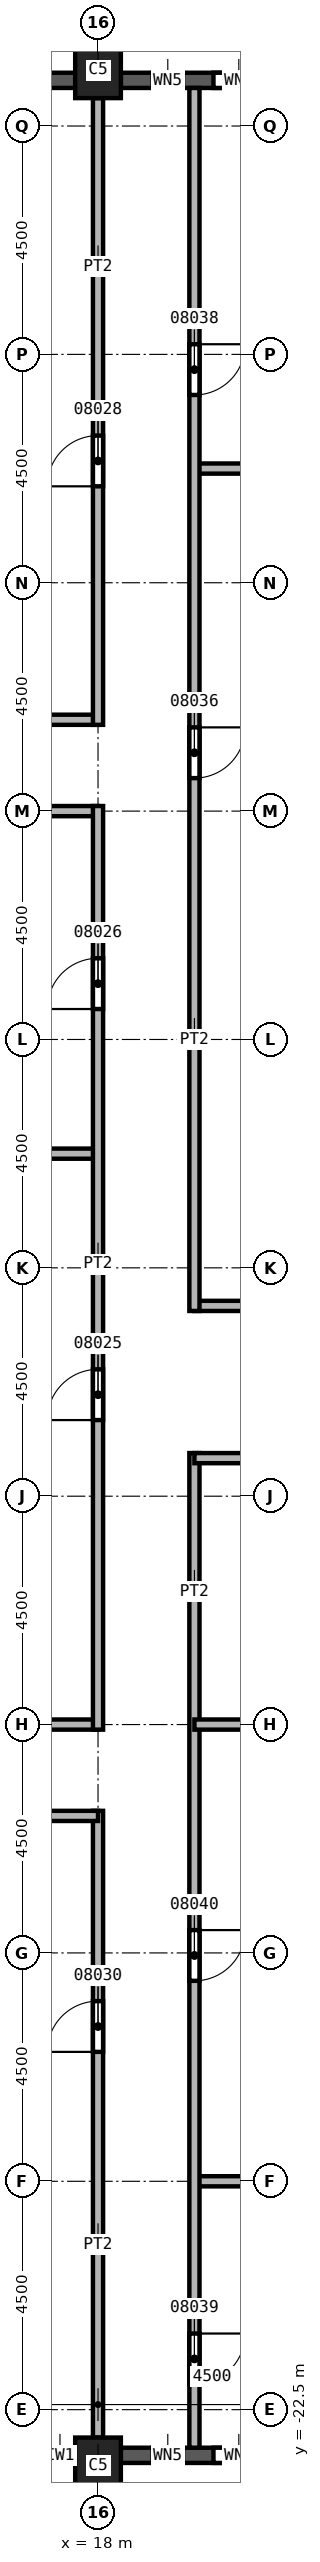
"""IFC4 building model, lengths in metres.
Left out: names, types, materials, properties, quantities, classifications, styles, units other than length and angle.
Written with IfcOpenShell. Run it as: python <this file> out.ifc"""

import sys

from ifc_helpers import new_model, si_unit, direction, frame, frame_2d, origin, origin_2d, place, context, subcontext, project, spatial, rectangle, extrude, element, fill, save


model = new_model("IFC4")
c1 = context("Model", 3, precision=1e-05, world=origin(), true_north=direction((0.0, 1.0)))
c2 = subcontext(c1, "Body", "Model", "MODEL_VIEW")
j1 = project(units=[si_unit("LENGTHUNIT", "METRE"), si_unit("PLANEANGLEUNIT", "RADIAN")], contexts=[c1])
p1 = place(None, origin())
s1 = spatial("IfcSite", under=j1, at=p1, CompositionType="ELEMENT")
p2 = place(p1, origin())
s2 = spatial("IfcBuilding", under=s1, at=p2, CompositionType="ELEMENT")
p3 = place(p2, frame((0.0, 0.0, 150.0)))
s3 = spatial("IfcBuildingStorey", under=s2, at=p3, CompositionType="ELEMENT", Elevation=150.0)
for number, where, z_axis, x_axis in (
    (1, (18.0, 23.6, 0.0), (0.0, 0.0, 1.0), (1.0, 0.0, 0.0)),
    (2, (18.0, -23.6, 0.0), (0.0, 0.0, 1.0), (1.0, 0.0, 0.0)),
):
    element("IfcColumn", number, at=place(p3, frame(where, z_axis=z_axis, x_axis=x_axis)), inside=s3, PredefinedType="COLUMN", context=c2, shape_type="SweptSolid", body=[
        extrude(rectangle(XDim=0.9, YDim=1.1, at=origin_2d()), origin(), (0.0, 0.0, 1.0), 3.7),
    ])
p4 = place(p3, frame((13.95, -23.4, 0.0), z_axis=(0.0, 0.0, 1.0), x_axis=(1.0, 0.0, 0.0)))
e3 = element("IfcWall", 3, at=p4, inside=s3, PredefinedType="SOLIDWALL", context=c2, shape_type="SweptSolid", body=[
    extrude(rectangle(XDim=3.6, YDim=0.3, at=frame_2d((1.8, 0.0))), origin(), (0.0, 0.0, 1.0), 3.1),
])
p5 = place(p4, frame((0.6, 0.0, 0.8)))
e4 = element("IfcOpeningElement", 4, at=p5, cuts=e3, PredefinedType="OPENING", context=c2, shape_type="SweptSolid", body=[
    extrude(rectangle(XDim=2.4, YDim=1.95, at=frame_2d((1.2, 0.975))), frame((0.0, 0.15, 0.0), z_axis=(0.0, -1.0, 0.0), x_axis=(1.0, 0.0, 0.0)), (0.0, 0.0, 1.0), 0.3),
])
p6 = place(p3, frame((18.45, -23.4, 0.0), z_axis=(0.0, 0.0, 1.0), x_axis=(1.0, 0.0, 0.0)))
e5 = element("IfcWall", 5, at=p6, inside=s3, PredefinedType="SOLIDWALL", context=c2, shape_type="SweptSolid", body=[
    extrude(rectangle(XDim=3.6, YDim=0.3, at=frame_2d((1.8, 0.0))), origin(), (0.0, 0.0, 1.0), 3.1),
])
p7 = place(p6, frame((0.625, 0.0, 0.8)))
e6 = element("IfcOpeningElement", 6, at=p7, cuts=e5, PredefinedType="OPENING", context=c2, shape_type="SweptSolid", body=[
    extrude(rectangle(XDim=0.6, YDim=1.95, at=frame_2d((0.3, 0.975))), frame((0.0, 0.15, 0.0), z_axis=(0.0, -1.0, 0.0), x_axis=(1.0, 0.0, 0.0)), (0.0, 0.0, 1.0), 0.3),
])
p8 = place(p6, frame((1.825, 0.0, 0.8)))
e7 = element("IfcOpeningElement", 7, at=p8, cuts=e5, PredefinedType="OPENING", context=c2, shape_type="SweptSolid", body=[
    extrude(rectangle(XDim=1.0, YDim=1.95, at=frame_2d((0.5, 0.975))), frame((0.0, 0.15, 0.0), z_axis=(0.0, -1.0, 0.0), x_axis=(1.0, 0.0, 0.0)), (0.0, 0.0, 1.0), 0.3),
])
p9 = place(p3, frame((22.05, 23.4, 0.0), z_axis=(0.0, 0.0, 1.0), x_axis=(-1.0, 0.0, 0.0)))
e8 = element("IfcWall", 8, at=p9, inside=s3, PredefinedType="SOLIDWALL", context=c2, shape_type="SweptSolid", body=[
    extrude(rectangle(XDim=3.6, YDim=0.3, at=frame_2d((1.8, 0.0))), origin(), (0.0, 0.0, 1.0), 3.1),
])
p10 = place(p9, frame((0.775, 0.0, 0.8)))
e9 = element("IfcOpeningElement", 9, at=p10, cuts=e8, PredefinedType="OPENING", context=c2, shape_type="SweptSolid", body=[
    extrude(rectangle(XDim=1.0, YDim=1.95, at=frame_2d((0.5, 0.975))), frame((0.0, 0.15, 0.0), z_axis=(0.0, -1.0, 0.0), x_axis=(1.0, 0.0, 0.0)), (0.0, 0.0, 1.0), 0.3),
])
p11 = place(p9, frame((2.375, 0.0, 0.8)))
e10 = element("IfcOpeningElement", 10, at=p11, cuts=e8, PredefinedType="OPENING", context=c2, shape_type="SweptSolid", body=[
    extrude(rectangle(XDim=0.6, YDim=1.95, at=frame_2d((0.3, 0.975))), frame((0.0, 0.15, 0.0), z_axis=(0.0, -1.0, 0.0), x_axis=(1.0, 0.0, 0.0)), (0.0, 0.0, 1.0), 0.3),
])
p12 = place(p3, frame((17.55, 23.4, 0.0), z_axis=(0.0, 0.0, 1.0), x_axis=(-1.0, 0.0, 0.0)))
e11 = element("IfcWall", 11, at=p12, inside=s3, PredefinedType="SOLIDWALL", context=c2, shape_type="SweptSolid", body=[
    extrude(rectangle(XDim=3.6, YDim=0.3, at=frame_2d((1.8, 0.0))), origin(), (0.0, 0.0, 1.0), 3.1),
])
p13 = place(p12, frame((0.6, 0.0, 0.8)))
e12 = element("IfcOpeningElement", 12, at=p13, cuts=e11, PredefinedType="OPENING", context=c2, shape_type="SweptSolid", body=[
    extrude(rectangle(XDim=2.4, YDim=1.95, at=frame_2d((1.2, 0.975))), frame((0.0, 0.15, 0.0), z_axis=(0.0, -1.0, 0.0), x_axis=(1.0, 0.0, 0.0)), (0.0, 0.0, 1.0), 0.3),
])
for number, where, z_axis, x_axis in (
    (13, (13.5, -9.0, 0.0), (0.0, 0.0, 1.0), (1.0, 0.0, 0.0)),
    (14, (13.5, 2.25, 0.0), (0.0, 0.0, 1.0), (1.0, 0.0, 0.0)),
    (15, (18.0, 9.0, 0.0), (0.0, 0.0, 1.0), (-1.0, 0.0, 0.0)),
):
    element("IfcWall", number, at=place(p3, frame(where, z_axis=z_axis, x_axis=x_axis)), inside=s3, PredefinedType="PARTITIONING", context=c2, shape_type="SweptSolid", body=[
        extrude(rectangle(XDim=4.5, YDim=0.2, at=frame_2d((2.25, 0.0))), origin(), (0.0, 0.0, 1.0), 3.7),
    ])
p14 = place(p3, frame((14.4, 10.8, 0.0), z_axis=(0.0, 0.0, 1.0), x_axis=(1.0, 0.0, 0.0)))
e16 = element("IfcWall", 16, at=p14, inside=s3, PredefinedType="PARTITIONING", context=c2, shape_type="SweptSolid", body=[
    extrude(rectangle(XDim=3.6, YDim=0.2, at=frame_2d((1.8, 0.0))), origin(), (0.0, 0.0, 1.0), 3.7),
])
p15 = place(p3, frame((18.0, -23.05, 0.0), z_axis=(0.0, 0.0, 1.0), x_axis=(0.0, 1.0, 0.0)))
e17 = element("IfcWall", 17, at=p15, inside=s3, PredefinedType="PARTITIONING", context=c2, shape_type="SweptSolid", body=[
    extrude(rectangle(XDim=12.35, YDim=0.2, at=frame_2d((6.175, 0.0))), origin(), (0.0, 0.0, 1.0), 3.7),
])
p16 = place(p15, frame((7.6, 0.0, 0.0)))
e18 = element("IfcOpeningElement", 18, at=p16, cuts=e17, PredefinedType="OPENING", context=c2, shape_type="SweptSolid", body=[
    extrude(rectangle(XDim=1.0, YDim=2.1, at=frame_2d((0.5, 1.05))), frame((0.0, 0.1, 0.0), z_axis=(0.0, -1.0, 0.0), x_axis=(1.0, 0.0, 0.0)), (0.0, 0.0, 1.0), 0.2),
])
p17 = place(p3, frame((18.0, -10.8, 0.0), z_axis=(0.0, 0.0, 1.0), x_axis=(-1.0, 0.0, 0.0)))
e19 = element("IfcWall", 19, at=p17, inside=s3, PredefinedType="PARTITIONING", context=c2, shape_type="SweptSolid", body=[
    extrude(rectangle(XDim=3.6, YDim=0.2, at=frame_2d((1.8, 0.0))), origin(), (0.0, 0.0, 1.0), 3.7),
])
p18 = place(p3, frame((18.0, -9.1, 0.0), z_axis=(0.0, 0.0, 1.0), x_axis=(0.0, 1.0, 0.0)))
e20 = element("IfcWall", 20, at=p18, inside=s3, PredefinedType="PARTITIONING", context=c2, shape_type="SweptSolid", body=[
    extrude(rectangle(XDim=18.2, YDim=0.2, at=frame_2d((9.1, 0.0))), origin(), (0.0, 0.0, 1.0), 3.7),
])
p19 = place(p18, frame((6.1, 0.0, 0.0)))
e21 = element("IfcOpeningElement", 21, at=p19, cuts=e20, PredefinedType="OPENING", context=c2, shape_type="SweptSolid", body=[
    extrude(rectangle(XDim=1.0, YDim=2.1, at=frame_2d((0.5, 1.05))), frame((0.0, 0.1, 0.0), z_axis=(0.0, -1.0, 0.0), x_axis=(1.0, 0.0, 0.0)), (0.0, 0.0, 1.0), 0.2),
])
p20 = place(p18, frame((14.2, 0.0, 0.0)))
e22 = element("IfcOpeningElement", 22, at=p20, cuts=e20, PredefinedType="OPENING", context=c2, shape_type="SweptSolid", body=[
    extrude(rectangle(XDim=1.0, YDim=2.1, at=frame_2d((0.5, 1.05))), frame((0.0, 0.1, 0.0), z_axis=(0.0, -1.0, 0.0), x_axis=(1.0, 0.0, 0.0)), (0.0, 0.0, 1.0), 0.2),
])
p21 = place(p3, frame((18.0, 10.7, 0.0), z_axis=(0.0, 0.0, 1.0), x_axis=(0.0, 1.0, 0.0)))
e23 = element("IfcWall", 23, at=p21, inside=s3, PredefinedType="PARTITIONING", context=c2, shape_type="SweptSolid", body=[
    extrude(rectangle(XDim=12.35, YDim=0.2, at=frame_2d((6.175, 0.0))), origin(), (0.0, 0.0, 1.0), 3.7),
])
p22 = place(p21, frame((4.7, 0.0, 0.0)))
e24 = element("IfcOpeningElement", 24, at=p22, cuts=e23, PredefinedType="OPENING", context=c2, shape_type="SweptSolid", body=[
    extrude(rectangle(XDim=1.0, YDim=2.1, at=frame_2d((0.5, 1.05))), frame((0.0, 0.1, 0.0), z_axis=(0.0, -1.0, 0.0), x_axis=(1.0, 0.0, 0.0)), (0.0, 0.0, 1.0), 0.2),
])
p23 = place(p3, frame((19.9, -18.0, 0.0), z_axis=(0.0, 0.0, 1.0), x_axis=(1.0, 0.0, 0.0)))
e25 = element("IfcWall", 25, at=p23, inside=s3, PredefinedType="PARTITIONING", context=c2, shape_type="SweptSolid", body=[
    extrude(rectangle(XDim=4.3, YDim=0.2, at=frame_2d((2.15, 0.0))), origin(), (0.0, 0.0, 1.0), 3.7),
])
p24 = place(p3, frame((19.9, -3.65, 0.0), z_axis=(0.0, 0.0, 1.0), x_axis=(0.0, -1.0, 0.0)))
e26 = element("IfcWall", 26, at=p24, inside=s3, PredefinedType="PARTITIONING", context=c2, shape_type="SweptSolid", body=[
    extrude(rectangle(XDim=19.6, YDim=0.2, at=frame_2d((9.8, 0.0))), origin(), (0.0, 0.0, 1.0), 3.7),
])
p25 = place(p24, frame((17.35, 0.0, 0.0)))
e27 = element("IfcOpeningElement", 27, at=p25, cuts=e26, PredefinedType="OPENING", context=c2, shape_type="SweptSolid", body=[
    extrude(rectangle(XDim=1.0, YDim=2.1, at=frame_2d((0.5, 1.05))), frame((0.0, 0.1, 0.0), z_axis=(0.0, -1.0, 0.0), x_axis=(1.0, 0.0, 0.0)), (0.0, 0.0, 1.0), 0.2),
])
p26 = place(p24, frame((9.4, 0.0, 0.0)))
e28 = element("IfcOpeningElement", 28, at=p26, cuts=e26, PredefinedType="OPENING", context=c2, shape_type="SweptSolid", body=[
    extrude(rectangle(XDim=1.0, YDim=2.1, at=frame_2d((0.5, 1.05))), frame((0.0, 0.1, 0.0), z_axis=(0.0, -1.0, 0.0), x_axis=(1.0, 0.0, 0.0)), (0.0, 0.0, 1.0), 0.2),
])
p27 = place(p3, frame((19.9, -9.0, 0.0), z_axis=(0.0, 0.0, 1.0), x_axis=(1.0, 0.0, 0.0)))
e29 = element("IfcWall", 29, at=p27, inside=s3, PredefinedType="PARTITIONING", context=c2, shape_type="SweptSolid", body=[
    extrude(rectangle(XDim=7.2, YDim=0.2, at=frame_2d((3.6, 0.0))), origin(), (0.0, 0.0, 1.0), 3.7),
])
p28 = place(p3, frame((19.9, -0.75, 0.0), z_axis=(0.0, 0.0, 1.0), x_axis=(1.0, 0.0, 0.0)))
e30 = element("IfcWall", 30, at=p28, inside=s3, PredefinedType="PARTITIONING", context=c2, shape_type="SweptSolid", body=[
    extrude(rectangle(XDim=13.95, YDim=0.2, at=frame_2d((6.975, 0.0))), origin(), (0.0, 0.0, 1.0), 3.7),
])
p29 = place(p28, frame((10.4, 0.0, 0.0)))
e31 = element("IfcOpeningElement", 31, at=p29, cuts=e30, PredefinedType="OPENING", context=c2, shape_type="SweptSolid", body=[
    extrude(rectangle(XDim=1.0, YDim=2.1, at=frame_2d((0.5, 1.05))), frame((0.0, 0.1, 0.0), z_axis=(0.0, -1.0, 0.0), x_axis=(1.0, 0.0, 0.0)), (0.0, 0.0, 1.0), 0.2),
])
p30 = place(p3, frame((19.9, 15.75, 0.0), z_axis=(0.0, 0.0, 1.0), x_axis=(1.0, 0.0, 0.0)))
e32 = element("IfcWall", 32, at=p30, inside=s3, PredefinedType="PARTITIONING", context=c2, shape_type="SweptSolid", body=[
    extrude(rectangle(XDim=7.2, YDim=0.2, at=frame_2d((3.6, 0.0))), origin(), (0.0, 0.0, 1.0), 3.7),
])
p31 = place(p3, frame((19.9, 23.25, 0.0), z_axis=(0.0, 0.0, 1.0), x_axis=(0.0, -1.0, 0.0)))
e33 = element("IfcWall", 33, at=p31, inside=s3, PredefinedType="PARTITIONING", context=c2, shape_type="SweptSolid", body=[
    extrude(rectangle(XDim=24.1, YDim=0.2, at=frame_2d((12.05, 0.0))), origin(), (0.0, 0.0, 1.0), 3.7),
])
p32 = place(p31, frame((12.6, 0.0, 0.0)))
e34 = element("IfcOpeningElement", 34, at=p32, cuts=e33, PredefinedType="OPENING", context=c2, shape_type="SweptSolid", body=[
    extrude(rectangle(XDim=1.0, YDim=2.1, at=frame_2d((0.5, 1.05))), frame((0.0, 0.1, 0.0), z_axis=(0.0, -1.0, 0.0), x_axis=(1.0, 0.0, 0.0)), (0.0, 0.0, 1.0), 0.2),
])
p33 = place(p31, frame((5.05, 0.0, 0.0)))
e35 = element("IfcOpeningElement", 35, at=p33, cuts=e33, PredefinedType="OPENING", context=c2, shape_type="SweptSolid", body=[
    extrude(rectangle(XDim=1.0, YDim=2.1, at=frame_2d((0.5, 1.05))), frame((0.0, 0.1, 0.0), z_axis=(0.0, -1.0, 0.0), x_axis=(1.0, 0.0, 0.0)), (0.0, 0.0, 1.0), 0.2),
])
p34 = place(p3, frame((33.85, -3.75, 0.0), z_axis=(0.0, 0.0, 1.0), x_axis=(-1.0, 0.0, 0.0)))
e36 = element("IfcWall", 36, at=p34, inside=s3, PredefinedType="PARTITIONING", context=c2, shape_type="SweptSolid", body=[
    extrude(rectangle(XDim=13.95, YDim=0.2, at=frame_2d((6.975, 0.0))), origin(), (0.0, 0.0, 1.0), 3.7),
])
p35 = place(p34, frame((8.95, 0.0, 0.0)))
e37 = element("IfcOpeningElement", 37, at=p35, cuts=e36, PredefinedType="OPENING", context=c2, shape_type="SweptSolid", body=[
    extrude(rectangle(XDim=1.0, YDim=2.1, at=frame_2d((0.5, 1.05))), frame((0.0, 0.1, 0.0), z_axis=(0.0, -1.0, 0.0), x_axis=(1.0, 0.0, 0.0)), (0.0, 0.0, 1.0), 0.2),
])
p36 = place(p19, origin())
e38 = element("IfcDoor", 38, at=p36, inside=s3, OperationType="SINGLE_SWING_RIGHT", PredefinedType="DOOR", context=c2, shape_type="SweptSolid", body=[
    extrude(rectangle(XDim=1.0, YDim=2.1, at=frame_2d((0.5, 1.05))), frame((0.0, 0.025, 0.0), z_axis=(0.0, -1.0, 0.0), x_axis=(1.0, 0.0, 0.0)), (0.0, 0.0, 1.0), 0.05),
])
fill(e21, e38)
p37 = place(p20, origin())
e39 = element("IfcDoor", 39, at=p37, inside=s3, OperationType="SINGLE_SWING_LEFT", PredefinedType="DOOR", context=c2, shape_type="SweptSolid", body=[
    extrude(rectangle(XDim=1.0, YDim=2.1, at=frame_2d((0.5, 1.05))), frame((0.0, 0.025, 0.0), z_axis=(0.0, -1.0, 0.0), x_axis=(1.0, 0.0, 0.0)), (0.0, 0.0, 1.0), 0.05),
])
fill(e22, e39)
p38 = place(p22, origin())
e40 = element("IfcDoor", 40, at=p38, inside=s3, OperationType="SINGLE_SWING_LEFT", PredefinedType="DOOR", context=c2, shape_type="SweptSolid", body=[
    extrude(rectangle(XDim=1.0, YDim=2.1, at=frame_2d((0.5, 1.05))), frame((0.0, 0.025, 0.0), z_axis=(0.0, -1.0, 0.0), x_axis=(1.0, 0.0, 0.0)), (0.0, 0.0, 1.0), 0.05),
])
fill(e24, e40)
p39 = place(p16, origin())
e41 = element("IfcDoor", 41, at=p39, inside=s3, OperationType="SINGLE_SWING_LEFT", PredefinedType="DOOR", context=c2, shape_type="SweptSolid", body=[
    extrude(rectangle(XDim=1.0, YDim=2.1, at=frame_2d((0.5, 1.05))), frame((0.0, 0.025, 0.0), z_axis=(0.0, -1.0, 0.0), x_axis=(1.0, 0.0, 0.0)), (0.0, 0.0, 1.0), 0.05),
])
fill(e18, e41)
p40 = place(p32, origin())
e42 = element("IfcDoor", 42, at=p40, inside=s3, OperationType="SINGLE_SWING_LEFT", PredefinedType="DOOR", context=c2, shape_type="SweptSolid", body=[
    extrude(rectangle(XDim=1.0, YDim=2.1, at=frame_2d((0.5, 1.05))), frame((0.0, 0.025, 0.0), z_axis=(0.0, -1.0, 0.0), x_axis=(1.0, 0.0, 0.0)), (0.0, 0.0, 1.0), 0.05),
])
fill(e34, e42)
p41 = place(p33, origin())
e43 = element("IfcDoor", 43, at=p41, inside=s3, OperationType="SINGLE_SWING_LEFT", PredefinedType="DOOR", context=c2, shape_type="SweptSolid", body=[
    extrude(rectangle(XDim=1.0, YDim=2.1, at=frame_2d((0.5, 1.05))), frame((0.0, 0.025, 0.0), z_axis=(0.0, -1.0, 0.0), x_axis=(1.0, 0.0, 0.0)), (0.0, 0.0, 1.0), 0.05),
])
fill(e35, e43)
p42 = place(p25, origin())
e44 = element("IfcDoor", 44, at=p42, inside=s3, OperationType="SINGLE_SWING_RIGHT", PredefinedType="DOOR", context=c2, shape_type="SweptSolid", body=[
    extrude(rectangle(XDim=1.0, YDim=2.1, at=frame_2d((0.5, 1.05))), frame((0.0, 0.025, 0.0), z_axis=(0.0, -1.0, 0.0), x_axis=(1.0, 0.0, 0.0)), (0.0, 0.0, 1.0), 0.05),
])
fill(e27, e44)
p43 = place(p26, origin())
e45 = element("IfcDoor", 45, at=p43, inside=s3, OperationType="SINGLE_SWING_LEFT", PredefinedType="DOOR", context=c2, shape_type="SweptSolid", body=[
    extrude(rectangle(XDim=1.0, YDim=2.1, at=frame_2d((0.5, 1.05))), frame((0.0, 0.025, 0.0), z_axis=(0.0, -1.0, 0.0), x_axis=(1.0, 0.0, 0.0)), (0.0, 0.0, 1.0), 0.05),
])
fill(e28, e45)
p44 = place(p7, origin())
e46 = element("IfcWindow", 46, at=p44, inside=s3, PartitioningType="SINGLE_PANEL", PredefinedType="WINDOW", context=c2, shape_type="SweptSolid", body=[
    extrude(rectangle(XDim=0.6, YDim=1.95, at=frame_2d((0.3, 0.975))), frame((0.0, 0.03, 0.0), z_axis=(0.0, -1.0, 0.0), x_axis=(1.0, 0.0, 0.0)), (0.0, 0.0, 1.0), 0.06),
])
fill(e6, e46)
p45 = place(p8, origin())
e47 = element("IfcWindow", 47, at=p45, inside=s3, PartitioningType="SINGLE_PANEL", PredefinedType="WINDOW", context=c2, shape_type="SweptSolid", body=[
    extrude(rectangle(XDim=1.0, YDim=1.95, at=frame_2d((0.5, 0.975))), frame((0.0, 0.03, 0.0), z_axis=(0.0, -1.0, 0.0), x_axis=(1.0, 0.0, 0.0)), (0.0, 0.0, 1.0), 0.06),
])
fill(e7, e47)
p46 = place(p10, origin())
e48 = element("IfcWindow", 48, at=p46, inside=s3, PartitioningType="SINGLE_PANEL", PredefinedType="WINDOW", context=c2, shape_type="SweptSolid", body=[
    extrude(rectangle(XDim=1.0, YDim=1.95, at=frame_2d((0.5, 0.975))), frame((0.0, 0.03, 0.0), z_axis=(0.0, -1.0, 0.0), x_axis=(1.0, 0.0, 0.0)), (0.0, 0.0, 1.0), 0.06),
])
fill(e9, e48)
p47 = place(p11, origin())
e49 = element("IfcWindow", 49, at=p47, inside=s3, PartitioningType="SINGLE_PANEL", PredefinedType="WINDOW", context=c2, shape_type="SweptSolid", body=[
    extrude(rectangle(XDim=0.6, YDim=1.95, at=frame_2d((0.3, 0.975))), frame((0.0, 0.03, 0.0), z_axis=(0.0, -1.0, 0.0), x_axis=(1.0, 0.0, 0.0)), (0.0, 0.0, 1.0), 0.06),
])
fill(e10, e49)
save(model, sys.argv[1])
